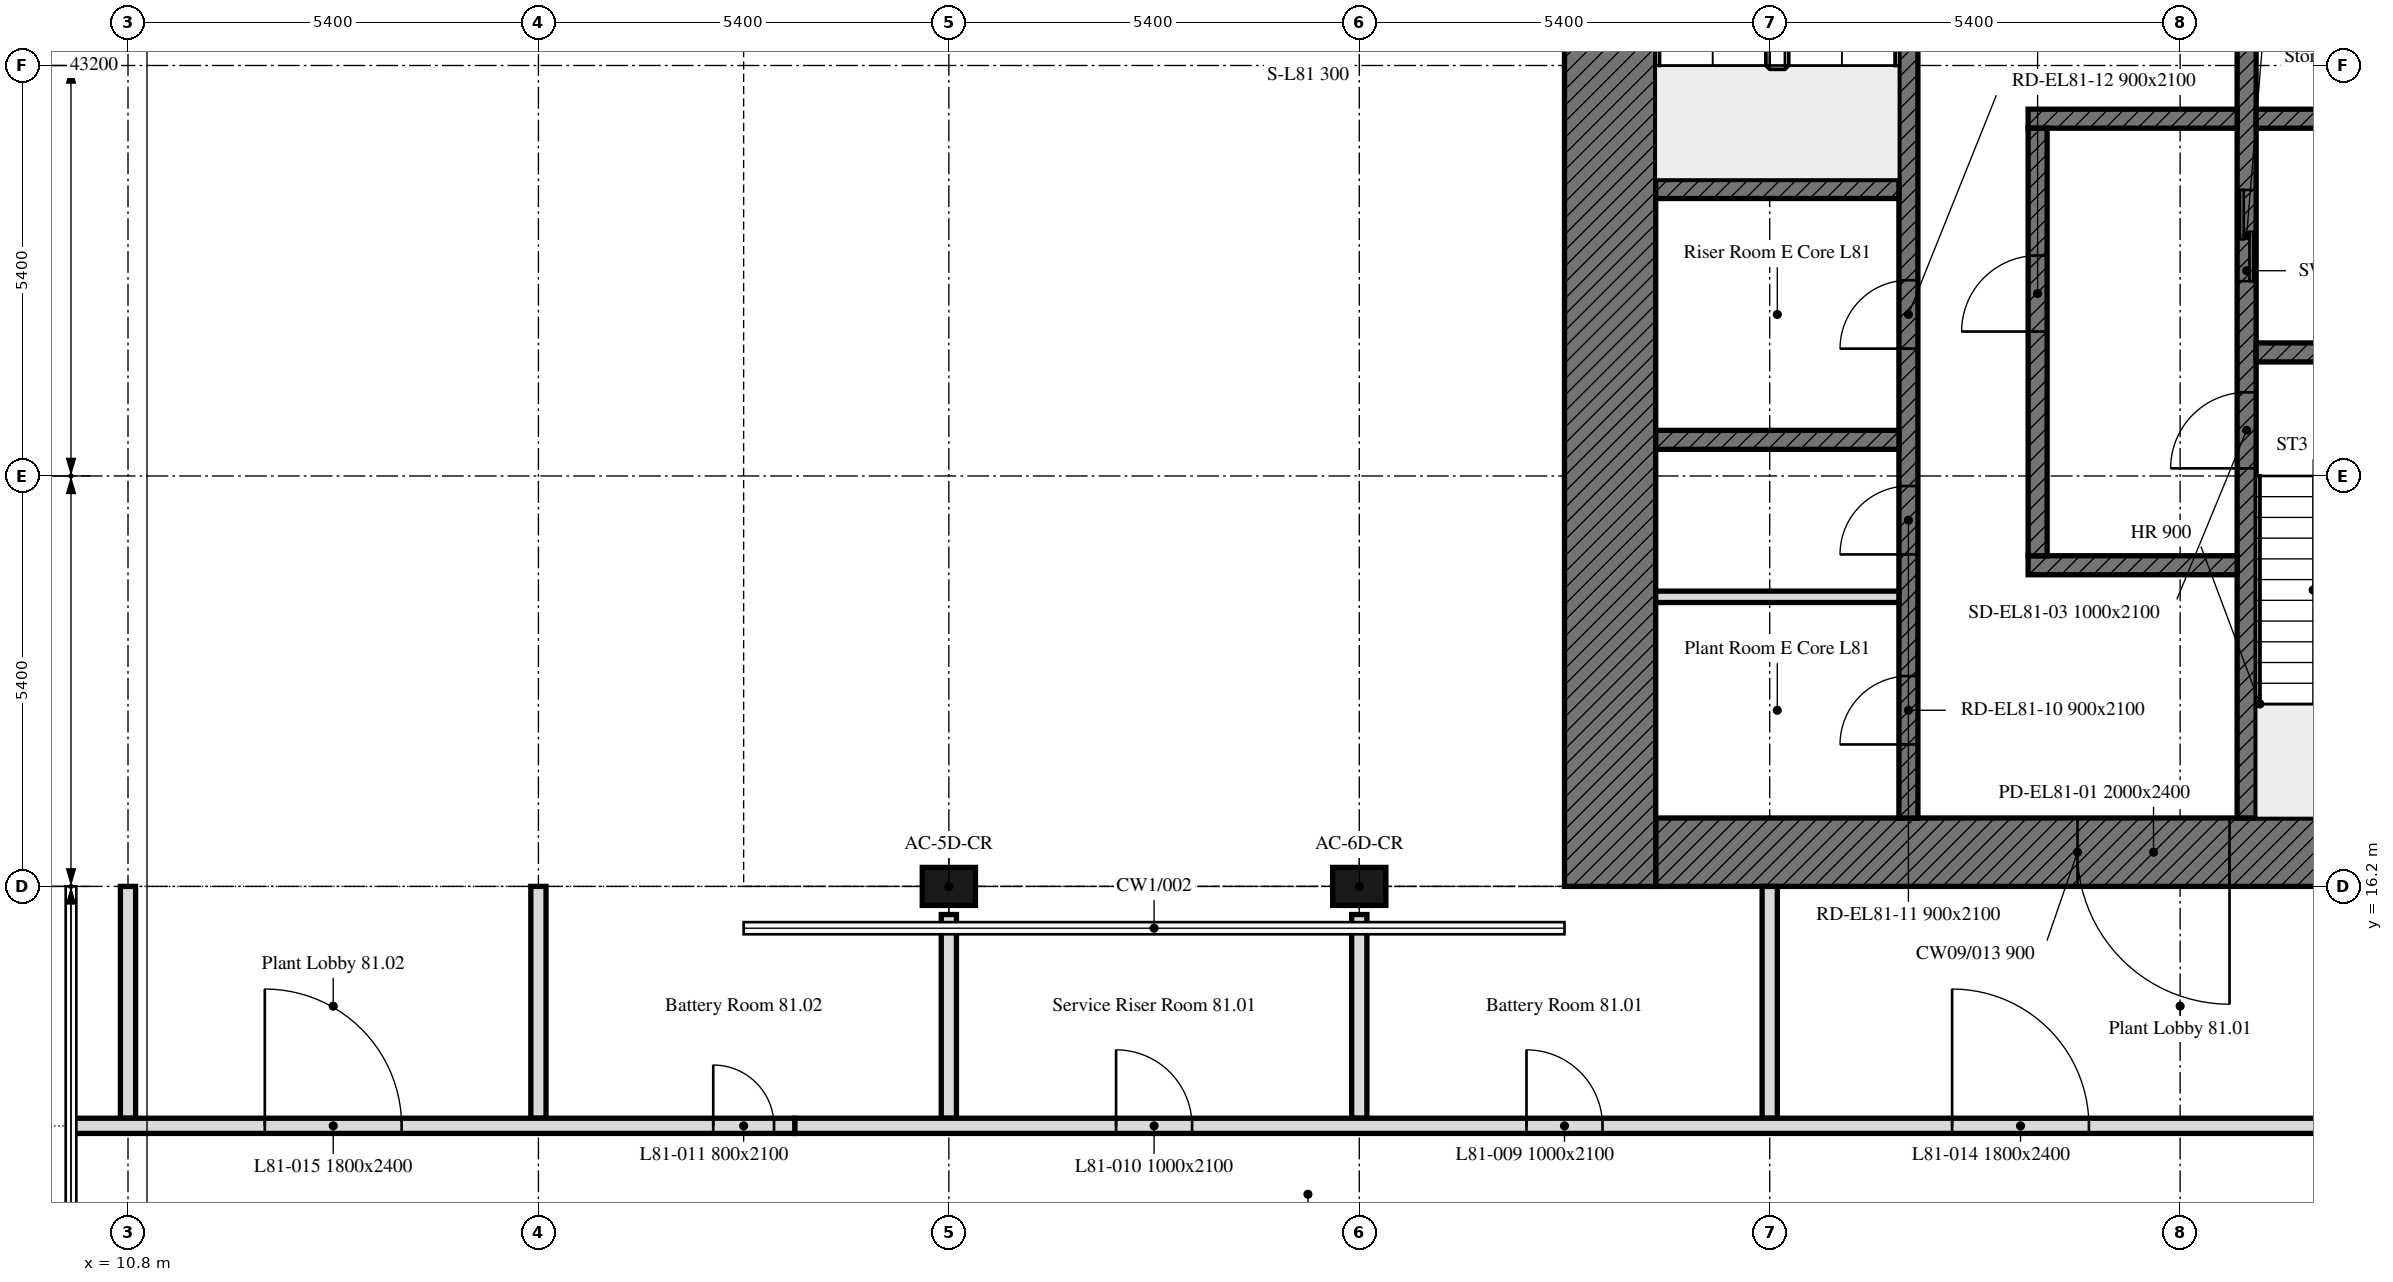
"""IFC4 building model, lengths in metres.
Left out: names, types, materials, properties, quantities, classifications, styles, units other than length and angle.
Written with IfcOpenShell. Run it as: python <this file> out.ifc"""

import sys

from ifc_helpers import new_model, si_unit, direction, frame, frame_2d, origin, origin_2d, place, context, subcontext, project, spatial, polyline, rectangle, outline, extrude, element, fill, save


model = new_model("IFC4")
c1 = context("Model", 3, precision=1e-05, world=origin(), true_north=direction((0.0, 1.0)))
c2 = subcontext(c1, "Body", "Model", "MODEL_VIEW")
j1 = project(units=[si_unit("LENGTHUNIT", "METRE"), si_unit("PLANEANGLEUNIT", "RADIAN")], contexts=[c1])
p1 = place(None, origin())
s1 = spatial("IfcSite", under=j1, at=p1, CompositionType="ELEMENT")
p2 = place(p1, origin())
s2 = spatial("IfcBuilding", under=s1, at=p2, CompositionType="ELEMENT")
p3 = place(p2, frame((0.0, 0.0, 326.2)))
s3 = spatial("IfcBuildingStorey", under=s2, at=p3, CompositionType="ELEMENT", Elevation=326.2)
for number, where, z_axis, x_axis in (
    (1, (21.6, 16.2, 0.0), (0.0, 0.0, 1.0), (1.0, 0.0, 0.0)),
    (2, (27.0, 16.2, 0.0), (0.0, 0.0, 1.0), (1.0, 0.0, 0.0)),
):
    element("IfcColumn", number, at=place(p3, frame(where, z_axis=z_axis, x_axis=x_axis)), inside=s3, PredefinedType="COLUMN", context=c2, shape_type="SweptSolid", body=[
        extrude(rectangle(XDim=0.7, YDim=0.5, at=origin_2d()), origin(), (0.0, 0.0, 1.0), 4.2),
    ])
p4 = place(p3, frame((42.0, 16.65, 0.0), z_axis=(0.0, 0.0, 1.0), x_axis=(-1.0, 0.0, 0.0)))
e3 = element("IfcWall", 3, at=p4, inside=s3, PredefinedType="SOLIDWALL", context=c2, shape_type="SweptSolid", body=[
    extrude(rectangle(XDim=11.1, YDim=0.9, at=frame_2d((5.55, 0.0))), origin(), (0.0, 0.0, 1.0), 4.2),
])
p5 = place(p4, frame((3.55, 0.0, 0.0)))
e4 = element("IfcOpeningElement", 4, at=p5, cuts=e3, PredefinedType="OPENING", context=c2, shape_type="SweptSolid", body=[
    extrude(rectangle(XDim=2.0, YDim=2.4, at=frame_2d((1.0, 1.2))), frame((0.0, 0.45, 0.0), z_axis=(0.0, -1.0, 0.0), x_axis=(1.0, 0.0, 0.0)), (0.0, 0.0, 1.0), 0.9),
])
p6 = place(p3, frame((30.3, 16.2, 0.0), z_axis=(0.0, 0.0, 1.0), x_axis=(0.0, 1.0, 0.0)))
e5 = element("IfcWall", 5, at=p6, inside=s3, PredefinedType="SOLIDWALL", context=c2, shape_type="SweptSolid", body=[
    extrude(rectangle(XDim=16.2, YDim=1.2, at=frame_2d((8.1, 0.0))), origin(), (0.0, 0.0, 1.0), 4.2),
])
p7 = place(p3, frame((38.675, 17.1, 0.0), z_axis=(0.0, 0.0, 1.0), x_axis=(0.0, 1.0, 0.0)))
e6 = element("IfcWall", 6, at=p7, inside=s3, PredefinedType="SOLIDWALL", context=c2, shape_type="SweptSolid", body=[
    extrude(rectangle(XDim=14.4, YDim=0.25, at=frame_2d((7.2, 0.0))), origin(), (0.0, 0.0, 1.0), 4.2),
])
p8 = place(p7, frame((4.6, 0.0, 0.0)))
e7 = element("IfcOpeningElement", 7, at=p8, cuts=e6, PredefinedType="OPENING", context=c2, shape_type="SweptSolid", body=[
    extrude(rectangle(XDim=1.0, YDim=2.1, at=frame_2d((0.5, 1.05))), frame((0.0, 0.125, 0.0), z_axis=(0.0, -1.0, 0.0), x_axis=(1.0, 0.0, 0.0)), (0.0, 0.0, 1.0), 0.25),
])
p9 = place(p7, frame((7.062, 0.0, 0.0)))
e8 = element("IfcOpeningElement", 8, at=p9, cuts=e6, PredefinedType="OPENING", context=c2, shape_type="SweptSolid", body=[
    extrude(rectangle(XDim=1.2, YDim=2.1, at=frame_2d((0.6, 1.05))), frame((0.0, 0.125, 0.0), z_axis=(0.0, -1.0, 0.0), x_axis=(1.0, 0.0, 0.0)), (0.0, 0.0, 1.0), 0.25),
])
p10 = place(p7, frame((10.106, 0.0, 0.0)))
e9 = element("IfcOpeningElement", 9, at=p10, cuts=e6, PredefinedType="OPENING", context=c2, shape_type="SweptSolid", body=[
    extrude(rectangle(XDim=0.9, YDim=2.1, at=frame_2d((0.45, 1.05))), frame((0.0, 0.125, 0.0), z_axis=(0.0, -1.0, 0.0), x_axis=(1.0, 0.0, 0.0)), (0.0, 0.0, 1.0), 0.25),
])
p11 = place(p7, frame((12.719, 0.0, 0.0)))
e10 = element("IfcOpeningElement", 10, at=p11, cuts=e6, PredefinedType="OPENING", context=c2, shape_type="SweptSolid", body=[
    extrude(rectangle(XDim=0.9, YDim=2.1, at=frame_2d((0.45, 1.05))), frame((0.0, 0.125, 0.0), z_axis=(0.0, -1.0, 0.0), x_axis=(1.0, 0.0, 0.0)), (0.0, 0.0, 1.0), 0.25),
])
p12 = place(p3, frame((34.225, 17.1, 0.0), z_axis=(0.0, 0.0, 1.0), x_axis=(0.0, 1.0, 0.0)))
e11 = element("IfcWall", 11, at=p12, inside=s3, PredefinedType="SOLIDWALL", context=c2, shape_type="SweptSolid", body=[
    extrude(rectangle(XDim=14.4, YDim=0.25, at=frame_2d((7.2, 0.0))), origin(), (0.0, 0.0, 1.0), 4.2),
])
p13 = place(p12, frame((13.15, 0.0, 0.0)))
e12 = element("IfcOpeningElement", 12, at=p13, cuts=e11, PredefinedType="OPENING", context=c2, shape_type="SweptSolid", body=[
    extrude(rectangle(XDim=1.0, YDim=2.1, at=frame_2d((0.5, 1.05))), frame((0.0, 0.125, 0.0), z_axis=(0.0, -1.0, 0.0), x_axis=(1.0, 0.0, 0.0)), (0.0, 0.0, 1.0), 0.25),
])
p14 = place(p12, frame((0.968, 0.0, 0.0)))
e13 = element("IfcOpeningElement", 13, at=p14, cuts=e11, PredefinedType="OPENING", context=c2, shape_type="SweptSolid", body=[
    extrude(rectangle(XDim=0.9, YDim=2.1, at=frame_2d((0.45, 1.05))), frame((0.0, 0.125, 0.0), z_axis=(0.0, -1.0, 0.0), x_axis=(1.0, 0.0, 0.0)), (0.0, 0.0, 1.0), 0.25),
])
p15 = place(p12, frame((3.468, 0.0, 0.0)))
e14 = element("IfcOpeningElement", 14, at=p15, cuts=e11, PredefinedType="OPENING", context=c2, shape_type="SweptSolid", body=[
    extrude(rectangle(XDim=0.9, YDim=2.1, at=frame_2d((0.45, 1.05))), frame((0.0, 0.125, 0.0), z_axis=(0.0, -1.0, 0.0), x_axis=(1.0, 0.0, 0.0)), (0.0, 0.0, 1.0), 0.25),
])
p16 = place(p12, frame((6.175, 0.0, 0.0)))
e15 = element("IfcOpeningElement", 15, at=p16, cuts=e11, PredefinedType="OPENING", context=c2, shape_type="SweptSolid", body=[
    extrude(rectangle(XDim=0.9, YDim=2.1, at=frame_2d((0.45, 1.05))), frame((0.0, 0.125, 0.0), z_axis=(0.0, -1.0, 0.0), x_axis=(1.0, 0.0, 0.0)), (0.0, 0.0, 1.0), 0.25),
])
p17 = place(p3, frame((38.8, 23.225, 0.0), z_axis=(0.0, 0.0, 1.0), x_axis=(1.0, 0.0, 0.0)))
e16 = element("IfcWall", 16, at=p17, inside=s3, PredefinedType="SOLIDWALL", context=c2, shape_type="SweptSolid", body=[
    extrude(rectangle(XDim=3.2, YDim=0.25, at=frame_2d((1.6, 0.0))), origin(), (0.0, 0.0, 1.0), 4.2),
])
for number, where, z_axis, x_axis in (
    (17, (30.9, 25.375, 0.0), (0.0, 0.0, 1.0), (1.0, 0.0, 0.0)),
    (18, (30.9, 22.075, 0.0), (0.0, 0.0, 1.0), (1.0, 0.0, 0.0)),
):
    element("IfcWall", number, at=place(p3, frame(where, z_axis=z_axis, x_axis=x_axis)), inside=s3, PredefinedType="SOLIDWALL", context=c2, shape_type="SweptSolid", body=[
        extrude(rectangle(XDim=3.2, YDim=0.25, at=frame_2d((1.6, 0.0))), origin(), (0.0, 0.0, 1.0), 4.2),
    ])
p18 = place(p3, frame((38.8, 26.3, 0.0), z_axis=(0.0, 0.0, 1.0), x_axis=(1.0, 0.0, 0.0)))
e19 = element("IfcWall", 19, at=p18, inside=s3, PredefinedType="SOLIDWALL", context=c2, shape_type="SweptSolid", body=[
    extrude(rectangle(XDim=3.2, YDim=0.25, at=frame_2d((1.6, 0.0))), origin(), (0.0, 0.0, 1.0), 4.2),
])
for number, where, z_axis, x_axis in (
    (20, (35.8, 26.3, 0.0), (0.0, 0.0, 1.0), (1.0, 0.0, 0.0)),
    (21, (35.8, 20.425, 0.0), (0.0, 0.0, 1.0), (1.0, 0.0, 0.0)),
):
    element("IfcWall", number, at=place(p3, frame(where, z_axis=z_axis, x_axis=x_axis)), inside=s3, PredefinedType="SOLIDWALL", context=c2, shape_type="SweptSolid", body=[
        extrude(rectangle(XDim=2.75, YDim=0.25, at=frame_2d((1.375, 0.0))), origin(), (0.0, 0.0, 1.0), 4.2),
    ])
p19 = place(p3, frame((35.925, 20.55, 0.0), z_axis=(0.0, 0.0, 1.0), x_axis=(0.0, 1.0, 0.0)))
e22 = element("IfcWall", 22, at=p19, inside=s3, PredefinedType="SOLIDWALL", context=c2, shape_type="SweptSolid", body=[
    extrude(rectangle(XDim=5.625, YDim=0.25, at=frame_2d((2.812, 0.0))), origin(), (0.0, 0.0, 1.0), 4.2),
])
p20 = place(p19, frame((2.95, 0.0, 0.0)))
e23 = element("IfcOpeningElement", 23, at=p20, cuts=e22, PredefinedType="OPENING", context=c2, shape_type="SweptSolid", body=[
    extrude(rectangle(XDim=1.0, YDim=2.1, at=frame_2d((0.5, 1.05))), frame((0.0, 0.125, 0.0), z_axis=(0.0, -1.0, 0.0), x_axis=(1.0, 0.0, 0.0)), (0.0, 0.0, 1.0), 0.25),
])
p21 = place(p3, frame((30.9, 20.01, 0.0), z_axis=(0.0, 0.0, 1.0), x_axis=(1.0, 0.0, 0.0)))
e24 = element("IfcWall", 24, at=p21, inside=s3, PredefinedType="PARTITIONING", context=c2, shape_type="SweptSolid", body=[
    extrude(rectangle(XDim=3.2, YDim=0.15, at=frame_2d((1.6, 0.0))), origin(), (0.0, 0.0, 1.0), 4.2),
])
p22 = place(p3, frame((27.0, 15.83, 0.0), z_axis=(0.0, 0.0, 1.0), x_axis=(0.0, -1.0, 0.0)))
e25 = element("IfcWall", 25, at=p22, inside=s3, PredefinedType="PARTITIONING", context=c2, shape_type="SweptSolid", body=[
    extrude(rectangle(XDim=2.68, YDim=0.2, at=frame_2d((1.34, 0.0))), origin(), (0.0, 0.0, 1.0), 4.2),
])
p23 = place(p3, frame((32.4, 13.15, 0.0), z_axis=(0.0, 0.0, 1.0), x_axis=(0.0, 1.0, 0.0)))
e26 = element("IfcWall", 26, at=p23, inside=s3, PredefinedType="PARTITIONING", context=c2, shape_type="SweptSolid", body=[
    extrude(rectangle(XDim=3.05, YDim=0.2, at=frame_2d((1.525, 0.0))), origin(), (0.0, 0.0, 1.0), 4.2),
])
p24 = place(p3, frame((21.6, 15.83, 0.0), z_axis=(0.0, 0.0, 1.0), x_axis=(0.0, -1.0, 0.0)))
e27 = element("IfcWall", 27, at=p24, inside=s3, PredefinedType="PARTITIONING", context=c2, shape_type="SweptSolid", body=[
    extrude(rectangle(XDim=2.68, YDim=0.2, at=frame_2d((1.34, 0.0))), origin(), (0.0, 0.0, 1.0), 4.2),
])
p25 = place(p3, frame((16.2, 16.2, 0.0), z_axis=(0.0, 0.0, 1.0), x_axis=(0.0, -1.0, 0.0)))
e28 = element("IfcWall", 28, at=p25, inside=s3, PredefinedType="PARTITIONING", context=c2, shape_type="SweptSolid", body=[
    extrude(rectangle(XDim=3.05, YDim=0.2, at=frame_2d((1.525, 0.0))), origin(), (0.0, 0.0, 1.0), 5.7),
])
p26 = place(p3, frame((10.8, 16.2, 0.0), z_axis=(0.0, 0.0, 1.0), x_axis=(0.0, -1.0, 0.0)))
e29 = element("IfcWall", 29, at=p26, inside=s3, PredefinedType="PARTITIONING", context=c2, shape_type="SweptSolid", body=[
    extrude(rectangle(XDim=3.05, YDim=0.2, at=frame_2d((1.525, 0.0))), origin(), (0.0, 0.0, 1.0), 3.3),
])
p27 = place(p3, frame((10.05, 13.05, 0.0), z_axis=(0.0, 0.0, 1.0), x_axis=(1.0, 0.0, 0.0)))
e30 = element("IfcWall", 30, at=p27, inside=s3, PredefinedType="PARTITIONING", context=c2, shape_type="SweptSolid", body=[
    extrude(outline(polyline([(0.0, 0.0), (9.525, 0.0), (9.525, 4.2), (0.0, 2.967), (0.0, 0.0)])), frame((0.0, 0.1, 0.0), z_axis=(0.0, -1.0, 0.0), x_axis=(1.0, 0.0, 0.0)), (0.0, 0.0, 1.0), 0.2),
])
p28 = place(p27, frame((8.45, 0.0, 0.0)))
e31 = element("IfcOpeningElement", 31, at=p28, cuts=e30, PredefinedType="OPENING", context=c2, shape_type="SweptSolid", body=[
    extrude(rectangle(XDim=0.8, YDim=2.1, at=frame_2d((0.4, 1.05))), frame((0.0, 0.1, 0.0), z_axis=(0.0, -1.0, 0.0), x_axis=(1.0, 0.0, 0.0)), (0.0, 0.0, 1.0), 0.2),
])
p29 = place(p27, frame((2.55, 0.0, 0.0)))
e32 = element("IfcOpeningElement", 32, at=p29, cuts=e30, PredefinedType="OPENING", context=c2, shape_type="SweptSolid", body=[
    extrude(rectangle(XDim=1.8, YDim=2.4, at=frame_2d((0.9, 1.2))), frame((0.0, 0.1, 0.0), z_axis=(0.0, -1.0, 0.0), x_axis=(1.0, 0.0, 0.0)), (0.0, 0.0, 1.0), 0.2),
])
p30 = place(p3, frame((19.575, 13.05, 0.0), z_axis=(0.0, 0.0, 1.0), x_axis=(1.0, 0.0, 0.0)))
e33 = element("IfcWall", 33, at=p30, inside=s3, PredefinedType="PARTITIONING", context=c2, shape_type="SweptSolid", body=[
    extrude(rectangle(XDim=21.774, YDim=0.2, at=frame_2d((10.887, 0.0))), origin(), (0.0, 0.0, 1.0), 4.2),
])
p31 = place(p30, frame((9.625, 0.0, 0.0)))
e34 = element("IfcOpeningElement", 34, at=p31, cuts=e33, PredefinedType="OPENING", context=c2, shape_type="SweptSolid", body=[
    extrude(rectangle(XDim=1.0, YDim=2.1, at=frame_2d((0.5, 1.05))), frame((0.0, 0.1, 0.0), z_axis=(0.0, -1.0, 0.0), x_axis=(1.0, 0.0, 0.0)), (0.0, 0.0, 1.0), 0.2),
])
p32 = place(p30, frame((4.225, 0.0, 0.0)))
e35 = element("IfcOpeningElement", 35, at=p32, cuts=e33, PredefinedType="OPENING", context=c2, shape_type="SweptSolid", body=[
    extrude(rectangle(XDim=1.0, YDim=2.1, at=frame_2d((0.5, 1.05))), frame((0.0, 0.1, 0.0), z_axis=(0.0, -1.0, 0.0), x_axis=(1.0, 0.0, 0.0)), (0.0, 0.0, 1.0), 0.2),
])
p33 = place(p30, frame((15.225, 0.0, 0.0)))
e36 = element("IfcOpeningElement", 36, at=p33, cuts=e33, PredefinedType="OPENING", context=c2, shape_type="SweptSolid", body=[
    extrude(rectangle(XDim=1.8, YDim=2.4, at=frame_2d((0.9, 1.2))), frame((0.0, 0.1, 0.0), z_axis=(0.0, -1.0, 0.0), x_axis=(1.0, 0.0, 0.0)), (0.0, 0.0, 1.0), 0.2),
])
p34 = place(p5, origin())
e37 = element("IfcDoor", 37, at=p34, inside=s3, OperationType="DOUBLE_DOOR_SINGLE_SWING", PredefinedType="DOOR", context=c2, shape_type="SweptSolid", body=[
    extrude(rectangle(XDim=2.0, YDim=2.4, at=frame_2d((1.0, 1.2))), frame((0.0, 0.025, 0.0), z_axis=(0.0, -1.0, 0.0), x_axis=(1.0, 0.0, 0.0)), (0.0, 0.0, 1.0), 0.05),
])
fill(e4, e37)
p35 = place(p8, origin())
e38 = element("IfcDoor", 38, at=p35, inside=s3, OperationType="SINGLE_SWING_LEFT", PredefinedType="DOOR", context=c2, shape_type="SweptSolid", body=[
    extrude(rectangle(XDim=1.0, YDim=2.1, at=frame_2d((0.5, 1.05))), frame((0.0, 0.025, 0.0), z_axis=(0.0, -1.0, 0.0), x_axis=(1.0, 0.0, 0.0)), (0.0, 0.0, 1.0), 0.05),
])
fill(e7, e38)
p36 = place(p20, origin())
e39 = element("IfcDoor", 39, at=p36, inside=s3, OperationType="SINGLE_SWING_LEFT", PredefinedType="DOOR", context=c2, shape_type="SweptSolid", body=[
    extrude(rectangle(XDim=1.0, YDim=2.1, at=frame_2d((0.5, 1.05))), frame((0.0, 0.025, 0.0), z_axis=(0.0, -1.0, 0.0), x_axis=(1.0, 0.0, 0.0)), (0.0, 0.0, 1.0), 0.05),
])
fill(e23, e39)
p37 = place(p9, origin())
e40 = element("IfcDoor", 40, at=p37, inside=s3, OperationType="DOUBLE_DOOR_SLIDING", PredefinedType="DOOR", context=c2, shape_type="SweptSolid", body=[
    extrude(rectangle(XDim=1.2, YDim=2.1, at=frame_2d((0.6, 1.05))), frame((0.0, 0.025, 0.0), z_axis=(0.0, -1.0, 0.0), x_axis=(1.0, 0.0, 0.0)), (0.0, 0.0, 1.0), 0.05),
])
fill(e8, e40)
p38 = place(p14, origin())
e41 = element("IfcDoor", 41, at=p38, inside=s3, OperationType="SINGLE_SWING_LEFT", PredefinedType="DOOR", context=c2, shape_type="SweptSolid", body=[
    extrude(rectangle(XDim=0.9, YDim=2.1, at=frame_2d((0.45, 1.05))), frame((0.0, 0.025, 0.0), z_axis=(0.0, -1.0, 0.0), x_axis=(1.0, 0.0, 0.0)), (0.0, 0.0, 1.0), 0.05),
])
fill(e13, e41)
p39 = place(p15, origin())
e42 = element("IfcDoor", 42, at=p39, inside=s3, OperationType="SINGLE_SWING_LEFT", PredefinedType="DOOR", context=c2, shape_type="SweptSolid", body=[
    extrude(rectangle(XDim=0.9, YDim=2.1, at=frame_2d((0.45, 1.05))), frame((0.0, 0.025, 0.0), z_axis=(0.0, -1.0, 0.0), x_axis=(1.0, 0.0, 0.0)), (0.0, 0.0, 1.0), 0.05),
])
fill(e14, e42)
p40 = place(p16, origin())
e43 = element("IfcDoor", 43, at=p40, inside=s3, OperationType="SINGLE_SWING_LEFT", PredefinedType="DOOR", context=c2, shape_type="SweptSolid", body=[
    extrude(rectangle(XDim=0.9, YDim=2.1, at=frame_2d((0.45, 1.05))), frame((0.0, 0.025, 0.0), z_axis=(0.0, -1.0, 0.0), x_axis=(1.0, 0.0, 0.0)), (0.0, 0.0, 1.0), 0.05),
])
fill(e15, e43)
p41 = place(p31, origin())
e44 = element("IfcDoor", 44, at=p41, inside=s3, OperationType="SINGLE_SWING_LEFT", PredefinedType="DOOR", context=c2, shape_type="SweptSolid", body=[
    extrude(rectangle(XDim=1.0, YDim=2.1, at=frame_2d((0.5, 1.05))), frame((0.0, 0.025, 0.0), z_axis=(0.0, -1.0, 0.0), x_axis=(1.0, 0.0, 0.0)), (0.0, 0.0, 1.0), 0.05),
])
fill(e34, e44)
p42 = place(p32, origin())
e45 = element("IfcDoor", 45, at=p42, inside=s3, OperationType="SINGLE_SWING_RIGHT", PredefinedType="DOOR", context=c2, shape_type="SweptSolid", body=[
    extrude(rectangle(XDim=1.0, YDim=2.1, at=frame_2d((0.5, 1.05))), frame((0.0, 0.025, 0.0), z_axis=(0.0, -1.0, 0.0), x_axis=(1.0, 0.0, 0.0)), (0.0, 0.0, 1.0), 0.05),
])
fill(e35, e45)
p43 = place(p28, origin())
e46 = element("IfcDoor", 46, at=p43, inside=s3, OperationType="SINGLE_SWING_RIGHT", PredefinedType="DOOR", context=c2, shape_type="SweptSolid", body=[
    extrude(rectangle(XDim=0.8, YDim=2.1, at=frame_2d((0.4, 1.05))), frame((0.0, 0.025, 0.0), z_axis=(0.0, -1.0, 0.0), x_axis=(1.0, 0.0, 0.0)), (0.0, 0.0, 1.0), 0.05),
])
fill(e31, e46)
p44 = place(p33, origin())
e47 = element("IfcDoor", 47, at=p44, inside=s3, OperationType="DOUBLE_DOOR_SINGLE_SWING", PredefinedType="DOOR", context=c2, shape_type="SweptSolid", body=[
    extrude(rectangle(XDim=1.8, YDim=2.4, at=frame_2d((0.9, 1.2))), frame((0.0, 0.025, 0.0), z_axis=(0.0, -1.0, 0.0), x_axis=(1.0, 0.0, 0.0)), (0.0, 0.0, 1.0), 0.05),
])
fill(e36, e47)
p45 = place(p29, origin())
e48 = element("IfcDoor", 48, at=p45, inside=s3, OperationType="DOUBLE_DOOR_SINGLE_SWING", PredefinedType="DOOR", context=c2, shape_type="SweptSolid", body=[
    extrude(rectangle(XDim=1.8, YDim=2.4, at=frame_2d((0.9, 1.2))), frame((0.0, 0.025, 0.0), z_axis=(0.0, -1.0, 0.0), x_axis=(1.0, 0.0, 0.0)), (0.0, 0.0, 1.0), 0.05),
])
fill(e32, e48)
save(model, sys.argv[1])
